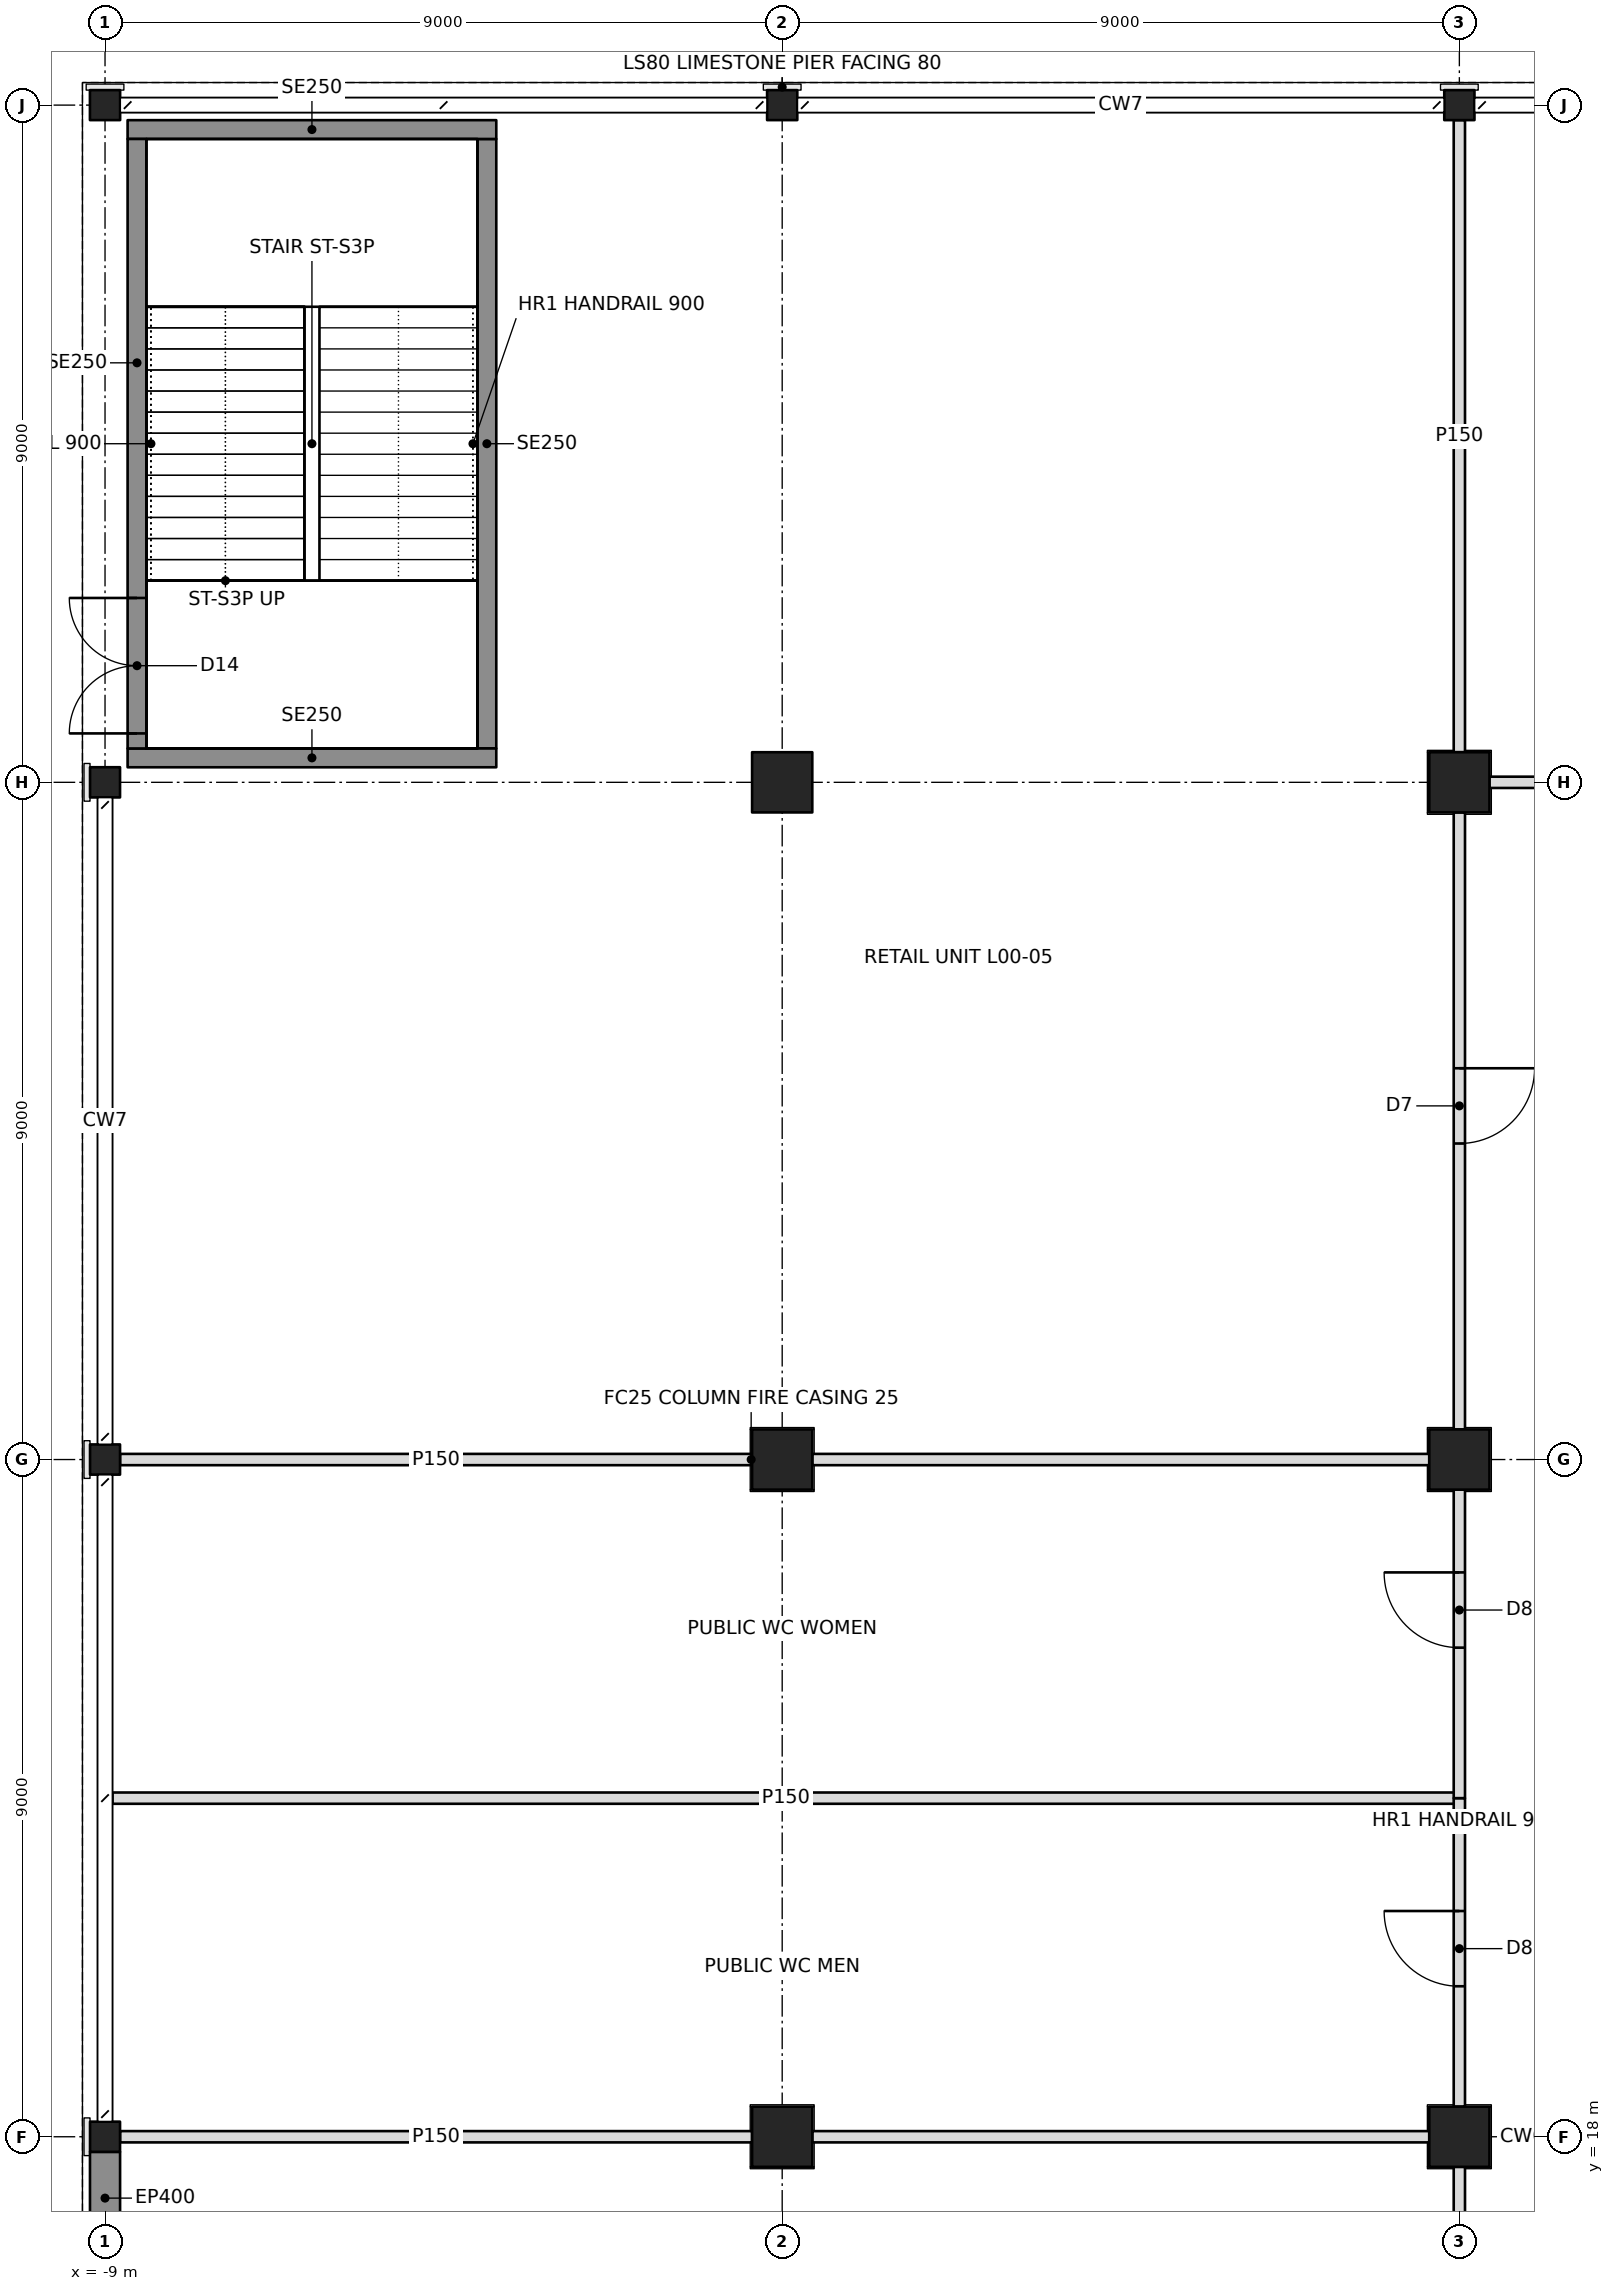
"""IFC4 building model, lengths in metres.
Left out: names, types, materials, properties, quantities, classifications, styles, units other than length and angle.
Written with IfcOpenShell. Run it as: python <this file> out.ifc"""

import sys

from ifc_helpers import new_model, si_unit, direction, frame, frame_2d, origin, origin_2d, place, context, subcontext, project, spatial, rectangle, hollow_rectangle, i_section, extrude, element, fill, save


model = new_model("IFC4")
c1 = context("Model", 3, precision=1e-05, world=origin(), true_north=direction((0.0, 1.0)))
c2 = subcontext(c1, "Body", "Model", "MODEL_VIEW")
j1 = project(units=[si_unit("LENGTHUNIT", "METRE"), si_unit("PLANEANGLEUNIT", "RADIAN")], contexts=[c1])
p1 = place(None, origin())
s1 = spatial("IfcSite", under=j1, at=p1, CompositionType="ELEMENT")
p2 = place(p1, origin())
s2 = spatial("IfcBuilding", under=s1, at=p2, CompositionType="ELEMENT")
p3 = place(p2, origin())
s3 = spatial("IfcBuildingStorey", under=s2, at=p3, CompositionType="ELEMENT", Elevation=0.0)
for number, where, z_axis, x_axis in (
    (1, (-9.0, 18.0, 0.0), (0.0, 0.0, 1.0), (0.0, 1.0, 0.0)),
    (2, (-9.0, 27.0, 0.0), (0.0, 0.0, 1.0), (0.0, 1.0, 0.0)),
    (3, (-9.0, 36.0, 0.0), (0.0, 0.0, 1.0), (0.0, 1.0, 0.0)),
    (4, (-9.0, 45.0, 0.0), (0.0, 0.0, 1.0), (1.0, 0.0, 0.0)),
):
    element("IfcColumn", number, at=place(p3, frame(where, z_axis=z_axis, x_axis=x_axis)), inside=s3, PredefinedType="COLUMN", context=c2, shape_type="SweptSolid", body=[
        extrude(i_section(OverallWidth=0.401, OverallDepth=0.399, WebThickness=0.025, FlangeThickness=0.04, at=origin_2d()), origin(), (0.0, 0.0, 1.0), 6.0),
    ])
for number, where, z_axis, x_axis in (
    (5, (0.0, 18.0, 0.0), (0.0, 0.0, 1.0), (0.0, 1.0, 0.0)),
    (6, (0.0, 27.0, 0.0), (0.0, 0.0, 1.0), (0.0, 1.0, 0.0)),
    (7, (0.0, 36.0, 0.0), (0.0, 0.0, 1.0), (1.0, 0.0, 0.0)),
):
    element("IfcColumn", number, at=place(p3, frame(where, z_axis=z_axis, x_axis=x_axis)), inside=s3, PredefinedType="COLUMN", context=c2, shape_type="SweptSolid", body=[
        extrude(hollow_rectangle(XDim=0.8, YDim=0.8, WallThickness=0.1, at=origin_2d()), origin(), (0.0, 0.0, 1.0), 6.0),
    ])
p4 = place(p3, frame((0.0, 45.0, 0.0), z_axis=(0.0, 0.0, 1.0), x_axis=(1.0, 0.0, 0.0)))
e8 = element("IfcColumn", 8, at=p4, inside=s3, PredefinedType="COLUMN", context=c2, shape_type="SweptSolid", body=[
    extrude(i_section(OverallWidth=0.401, OverallDepth=0.399, WebThickness=0.025, FlangeThickness=0.04, at=origin_2d()), origin(), (0.0, 0.0, 1.0), 6.0),
])
for number, where, z_axis, x_axis in (
    (9, (9.0, 18.0, 0.0), (0.0, 0.0, 1.0), (1.0, 0.0, 0.0)),
    (10, (9.0, 27.0, 0.0), (0.0, 0.0, 1.0), (1.0, 0.0, 0.0)),
    (11, (9.0, 36.0, 0.0), (0.0, 0.0, 1.0), (1.0, 0.0, 0.0)),
):
    element("IfcColumn", number, at=place(p3, frame(where, z_axis=z_axis, x_axis=x_axis)), inside=s3, PredefinedType="COLUMN", context=c2, shape_type="SweptSolid", body=[
        extrude(hollow_rectangle(XDim=0.8, YDim=0.8, WallThickness=0.1, at=origin_2d()), origin(), (0.0, 0.0, 1.0), 6.0),
    ])
p5 = place(p3, frame((9.0, 45.0, 0.0), z_axis=(0.0, 0.0, 1.0), x_axis=(1.0, 0.0, 0.0)))
e12 = element("IfcColumn", 12, at=p5, inside=s3, PredefinedType="COLUMN", context=c2, shape_type="SweptSolid", body=[
    extrude(i_section(OverallWidth=0.401, OverallDepth=0.399, WebThickness=0.025, FlangeThickness=0.04, at=origin_2d()), origin(), (0.0, 0.0, 1.0), 6.0),
])
p6 = place(p3, frame((-9.0, 17.799, 0.0), z_axis=(0.0, 0.0, 1.0), x_axis=(0.0, -1.0, 0.0)))
e13 = element("IfcWall", 13, at=p6, inside=s3, PredefinedType="SOLIDWALL", context=c2, shape_type="SweptSolid", body=[
    extrude(rectangle(XDim=8.599, YDim=0.4, at=frame_2d((4.299, 0.0))), origin(), (0.0, 0.0, 1.0), 5.054),
])
p7 = place(p6, frame((1.38, 0.0, 0.0)))
e14 = element("IfcOpeningElement", 14, at=p7, cuts=e13, PredefinedType="OPENING", context=c2, shape_type="SweptSolid", body=[
    extrude(rectangle(XDim=2.4, YDim=2.7, at=frame_2d((1.2, 1.35))), frame((0.0, 0.21, 0.0), z_axis=(0.0, -1.0, 0.0), x_axis=(1.0, 0.0, 0.0)), (0.0, 0.0, 1.0), 0.42),
])
p8 = place(p6, frame((4.819, 0.0, 0.0)))
e15 = element("IfcOpeningElement", 15, at=p8, cuts=e13, PredefinedType="OPENING", context=c2, shape_type="SweptSolid", body=[
    extrude(rectangle(XDim=2.4, YDim=2.7, at=frame_2d((1.2, 1.35))), frame((0.0, 0.21, 0.0), z_axis=(0.0, -1.0, 0.0), x_axis=(1.0, 0.0, 0.0)), (0.0, 0.0, 1.0), 0.42),
])
p9 = place(p3, frame((-8.801, 18.0, 0.0), z_axis=(0.0, 0.0, 1.0), x_axis=(1.0, 0.0, 0.0)))
e16 = element("IfcWall", 16, at=p9, inside=s3, PredefinedType="PARTITIONING", context=c2, shape_type="SweptSolid", body=[
    extrude(rectangle(XDim=8.401, YDim=0.15, at=frame_2d((4.2, 0.0))), origin(), (0.0, 0.0, 1.0), 4.892),
])
p10 = place(p3, frame((0.4, 18.0, 0.0), z_axis=(0.0, 0.0, 1.0), x_axis=(1.0, 0.0, 0.0)))
e17 = element("IfcWall", 17, at=p10, inside=s3, PredefinedType="PARTITIONING", context=c2, shape_type="SweptSolid", body=[
    extrude(rectangle(XDim=8.2, YDim=0.15, at=frame_2d((4.1, 0.0))), origin(), (0.0, 0.0, 1.0), 4.892),
])
p11 = place(p3, frame((-8.9, 22.5, 0.0), z_axis=(0.0, 0.0, 1.0), x_axis=(1.0, 0.0, 0.0)))
e18 = element("IfcWall", 18, at=p11, inside=s3, PredefinedType="PARTITIONING", context=c2, shape_type="SweptSolid", body=[
    extrude(rectangle(XDim=17.9, YDim=0.15, at=frame_2d((8.95, 0.0))), origin(), (0.0, 0.0, 1.0), 4.891),
])
p12 = place(p3, frame((-8.801, 27.0, 0.0), z_axis=(0.0, 0.0, 1.0), x_axis=(1.0, 0.0, 0.0)))
e19 = element("IfcWall", 19, at=p12, inside=s3, PredefinedType="PARTITIONING", context=c2, shape_type="SweptSolid", body=[
    extrude(rectangle(XDim=8.401, YDim=0.15, at=frame_2d((4.2, 0.0))), origin(), (0.0, 0.0, 1.0), 4.892),
])
p13 = place(p3, frame((0.4, 27.0, 0.0), z_axis=(0.0, 0.0, 1.0), x_axis=(1.0, 0.0, 0.0)))
e20 = element("IfcWall", 20, at=p13, inside=s3, PredefinedType="PARTITIONING", context=c2, shape_type="SweptSolid", body=[
    extrude(rectangle(XDim=8.2, YDim=0.15, at=frame_2d((4.1, 0.0))), origin(), (0.0, 0.0, 1.0), 4.892),
])
p14 = place(p3, frame((9.0, 17.6, 0.0), z_axis=(0.0, 0.0, 1.0), x_axis=(0.0, -1.0, 0.0)))
e21 = element("IfcWall", 21, at=p14, inside=s3, PredefinedType="PARTITIONING", context=c2, shape_type="SweptSolid", body=[
    extrude(rectangle(XDim=6.45, YDim=0.15, at=frame_2d((3.225, 0.0))), origin(), (0.0, 0.0, 1.0), 4.892),
])
p15 = place(p14, frame((2.1, 0.0, 0.0)))
e22 = element("IfcOpeningElement", 22, at=p15, cuts=e21, PredefinedType="OPENING", context=c2, shape_type="SweptSolid", body=[
    extrude(rectangle(XDim=1.0, YDim=2.1, at=frame_2d((0.5, 1.05))), frame((0.0, 0.085, 0.0), z_axis=(0.0, -1.0, 0.0), x_axis=(1.0, 0.0, 0.0)), (0.0, 0.0, 1.0), 0.17),
])
p16 = place(p3, frame((9.0, 22.5, 0.0), z_axis=(0.0, 0.0, 1.0), x_axis=(0.0, -1.0, 0.0)))
e23 = element("IfcWall", 23, at=p16, inside=s3, PredefinedType="PARTITIONING", context=c2, shape_type="SweptSolid", body=[
    extrude(rectangle(XDim=4.1, YDim=0.15, at=frame_2d((2.05, 0.0))), origin(), (0.0, 0.0, 1.0), 4.892),
])
p17 = place(p16, frame((1.5, 0.0, 0.0)))
e24 = element("IfcOpeningElement", 24, at=p17, cuts=e23, PredefinedType="OPENING", context=c2, shape_type="SweptSolid", body=[
    extrude(rectangle(XDim=1.0, YDim=2.1, at=frame_2d((0.5, 1.05))), frame((0.0, 0.085, 0.0), z_axis=(0.0, -1.0, 0.0), x_axis=(1.0, 0.0, 0.0)), (0.0, 0.0, 1.0), 0.17),
])
p18 = place(p3, frame((9.0, 26.6, 0.0), z_axis=(0.0, 0.0, 1.0), x_axis=(0.0, -1.0, 0.0)))
e25 = element("IfcWall", 25, at=p18, inside=s3, PredefinedType="PARTITIONING", context=c2, shape_type="SweptSolid", body=[
    extrude(rectangle(XDim=4.1, YDim=0.15, at=frame_2d((2.05, 0.0))), origin(), (0.0, 0.0, 1.0), 4.892),
])
p19 = place(p18, frame((1.1, 0.0, 0.0)))
e26 = element("IfcOpeningElement", 26, at=p19, cuts=e25, PredefinedType="OPENING", context=c2, shape_type="SweptSolid", body=[
    extrude(rectangle(XDim=1.0, YDim=2.1, at=frame_2d((0.5, 1.05))), frame((0.0, 0.085, 0.0), z_axis=(0.0, -1.0, 0.0), x_axis=(1.0, 0.0, 0.0)), (0.0, 0.0, 1.0), 0.17),
])
p20 = place(p3, frame((9.0, 35.6, 0.0), z_axis=(0.0, 0.0, 1.0), x_axis=(0.0, -1.0, 0.0)))
e27 = element("IfcWall", 27, at=p20, inside=s3, PredefinedType="PARTITIONING", context=c2, shape_type="SweptSolid", body=[
    extrude(rectangle(XDim=8.2, YDim=0.15, at=frame_2d((4.1, 0.0))), origin(), (0.0, 0.0, 1.0), 4.892),
])
p21 = place(p20, frame((3.4, 0.0, 0.0)))
e28 = element("IfcOpeningElement", 28, at=p21, cuts=e27, PredefinedType="OPENING", context=c2, shape_type="SweptSolid", body=[
    extrude(rectangle(XDim=1.0, YDim=2.1, at=frame_2d((0.5, 1.05))), frame((0.0, 0.085, 0.0), z_axis=(0.0, -1.0, 0.0), x_axis=(1.0, 0.0, 0.0)), (0.0, 0.0, 1.0), 0.17),
])
p22 = place(p3, frame((17.6, 36.0, 0.0), z_axis=(0.0, 0.0, 1.0), x_axis=(-1.0, 0.0, 0.0)))
e29 = element("IfcWall", 29, at=p22, inside=s3, PredefinedType="PARTITIONING", context=c2, shape_type="SweptSolid", body=[
    extrude(rectangle(XDim=8.2, YDim=0.15, at=frame_2d((4.1, 0.0))), origin(), (0.0, 0.0, 1.0), 4.892),
])
p23 = place(p22, frame((3.6, 0.0, 0.0)))
e30 = element("IfcOpeningElement", 30, at=p23, cuts=e29, PredefinedType="OPENING", context=c2, shape_type="SweptSolid", body=[
    extrude(rectangle(XDim=1.0, YDim=2.1, at=frame_2d((0.5, 1.05))), frame((0.0, 0.085, 0.0), z_axis=(0.0, -1.0, 0.0), x_axis=(1.0, 0.0, 0.0)), (0.0, 0.0, 1.0), 0.17),
])
p24 = place(p3, frame((9.0, 36.4, 0.0), z_axis=(0.0, 0.0, 1.0), x_axis=(0.0, 1.0, 0.0)))
e31 = element("IfcWall", 31, at=p24, inside=s3, PredefinedType="PARTITIONING", context=c2, shape_type="SweptSolid", body=[
    extrude(rectangle(XDim=8.401, YDim=0.15, at=frame_2d((4.2, 0.0))), origin(), (0.0, 0.0, 1.0), 4.892),
])
for number, where, z_axis, x_axis in (
    (32, (-8.7, 36.325, 0.0), (0.0, 0.0, 1.0), (1.0, 0.0, 0.0)),
    (33, (-8.7, 44.675, 0.0), (0.0, 0.0, 1.0), (1.0, 0.0, 0.0)),
):
    element("IfcWall", number, at=place(p3, frame(where, z_axis=z_axis, x_axis=x_axis)), inside=s3, PredefinedType="SOLIDWALL", context=c2, shape_type="SweptSolid", body=[
        extrude(rectangle(XDim=4.9, YDim=0.25, at=frame_2d((2.45, 0.0))), origin(), (0.0, 0.0, 1.0), 5.75),
    ])
p25 = place(p3, frame((-8.575, 36.45, 0.0), z_axis=(0.0, 0.0, 1.0), x_axis=(0.0, 1.0, 0.0)))
e34 = element("IfcWall", 34, at=p25, inside=s3, PredefinedType="SOLIDWALL", context=c2, shape_type="SweptSolid", body=[
    extrude(rectangle(XDim=8.1, YDim=0.25, at=frame_2d((4.05, 0.0))), origin(), (0.0, 0.0, 1.0), 5.75),
])
p26 = place(p25, frame((0.2, 0.0, 0.0)))
e35 = element("IfcOpeningElement", 35, at=p26, cuts=e34, PredefinedType="OPENING", context=c2, shape_type="SweptSolid", body=[
    extrude(rectangle(XDim=1.8, YDim=2.1, at=frame_2d((0.9, 1.05))), frame((0.0, 0.135, 0.0), z_axis=(0.0, -1.0, 0.0), x_axis=(1.0, 0.0, 0.0)), (0.0, 0.0, 1.0), 0.27),
])
p27 = place(p3, frame((-3.925, 36.45, 0.0), z_axis=(0.0, 0.0, 1.0), x_axis=(0.0, 1.0, 0.0)))
e36 = element("IfcWall", 36, at=p27, inside=s3, PredefinedType="SOLIDWALL", context=c2, shape_type="SweptSolid", body=[
    extrude(rectangle(XDim=8.1, YDim=0.25, at=frame_2d((4.05, 0.0))), origin(), (0.0, 0.0, 1.0), 5.75),
])
p28 = place(p17, frame((1.0, 0.0, 0.0), z_axis=(0.0, 0.0, 1.0), x_axis=(-1.0, 0.0, 0.0)))
e37 = element("IfcDoor", 37, at=p28, inside=s3, OperationType="SINGLE_SWING_RIGHT", PredefinedType="DOOR", context=c2, shape_type="SweptSolid", body=[
    extrude(rectangle(XDim=1.0, YDim=2.1, at=frame_2d((0.5, 1.05))), frame((0.0, 0.025, 0.0), z_axis=(0.0, -1.0, 0.0), x_axis=(1.0, 0.0, 0.0)), (0.0, 0.0, 1.0), 0.05),
])
fill(e24, e37)
p29 = place(p19, frame((1.0, 0.0, 0.0), z_axis=(0.0, 0.0, 1.0), x_axis=(-1.0, 0.0, 0.0)))
e38 = element("IfcDoor", 38, at=p29, inside=s3, OperationType="SINGLE_SWING_RIGHT", PredefinedType="DOOR", context=c2, shape_type="SweptSolid", body=[
    extrude(rectangle(XDim=1.0, YDim=2.1, at=frame_2d((0.5, 1.05))), frame((0.0, 0.025, 0.0), z_axis=(0.0, -1.0, 0.0), x_axis=(1.0, 0.0, 0.0)), (0.0, 0.0, 1.0), 0.05),
])
fill(e26, e38)
p30 = place(p21, origin())
e39 = element("IfcDoor", 39, at=p30, inside=s3, OperationType="SINGLE_SWING_LEFT", PredefinedType="DOOR", context=c2, shape_type="SweptSolid", body=[
    extrude(rectangle(XDim=1.0, YDim=2.1, at=frame_2d((0.5, 1.05))), frame((0.0, 0.025, 0.0), z_axis=(0.0, -1.0, 0.0), x_axis=(1.0, 0.0, 0.0)), (0.0, 0.0, 1.0), 0.05),
])
fill(e28, e39)
p31 = place(p26, origin())
e40 = element("IfcDoor", 40, at=p31, inside=s3, OperationType="DOUBLE_DOOR_SINGLE_SWING", PredefinedType="DOOR", context=c2, shape_type="SweptSolid", body=[
    extrude(rectangle(XDim=1.8, YDim=2.1, at=frame_2d((0.9, 1.05))), frame((0.0, 0.025, 0.0), z_axis=(0.0, -1.0, 0.0), x_axis=(1.0, 0.0, 0.0)), (0.0, 0.0, 1.0), 0.05),
])
fill(e35, e40)
save(model, sys.argv[1])
